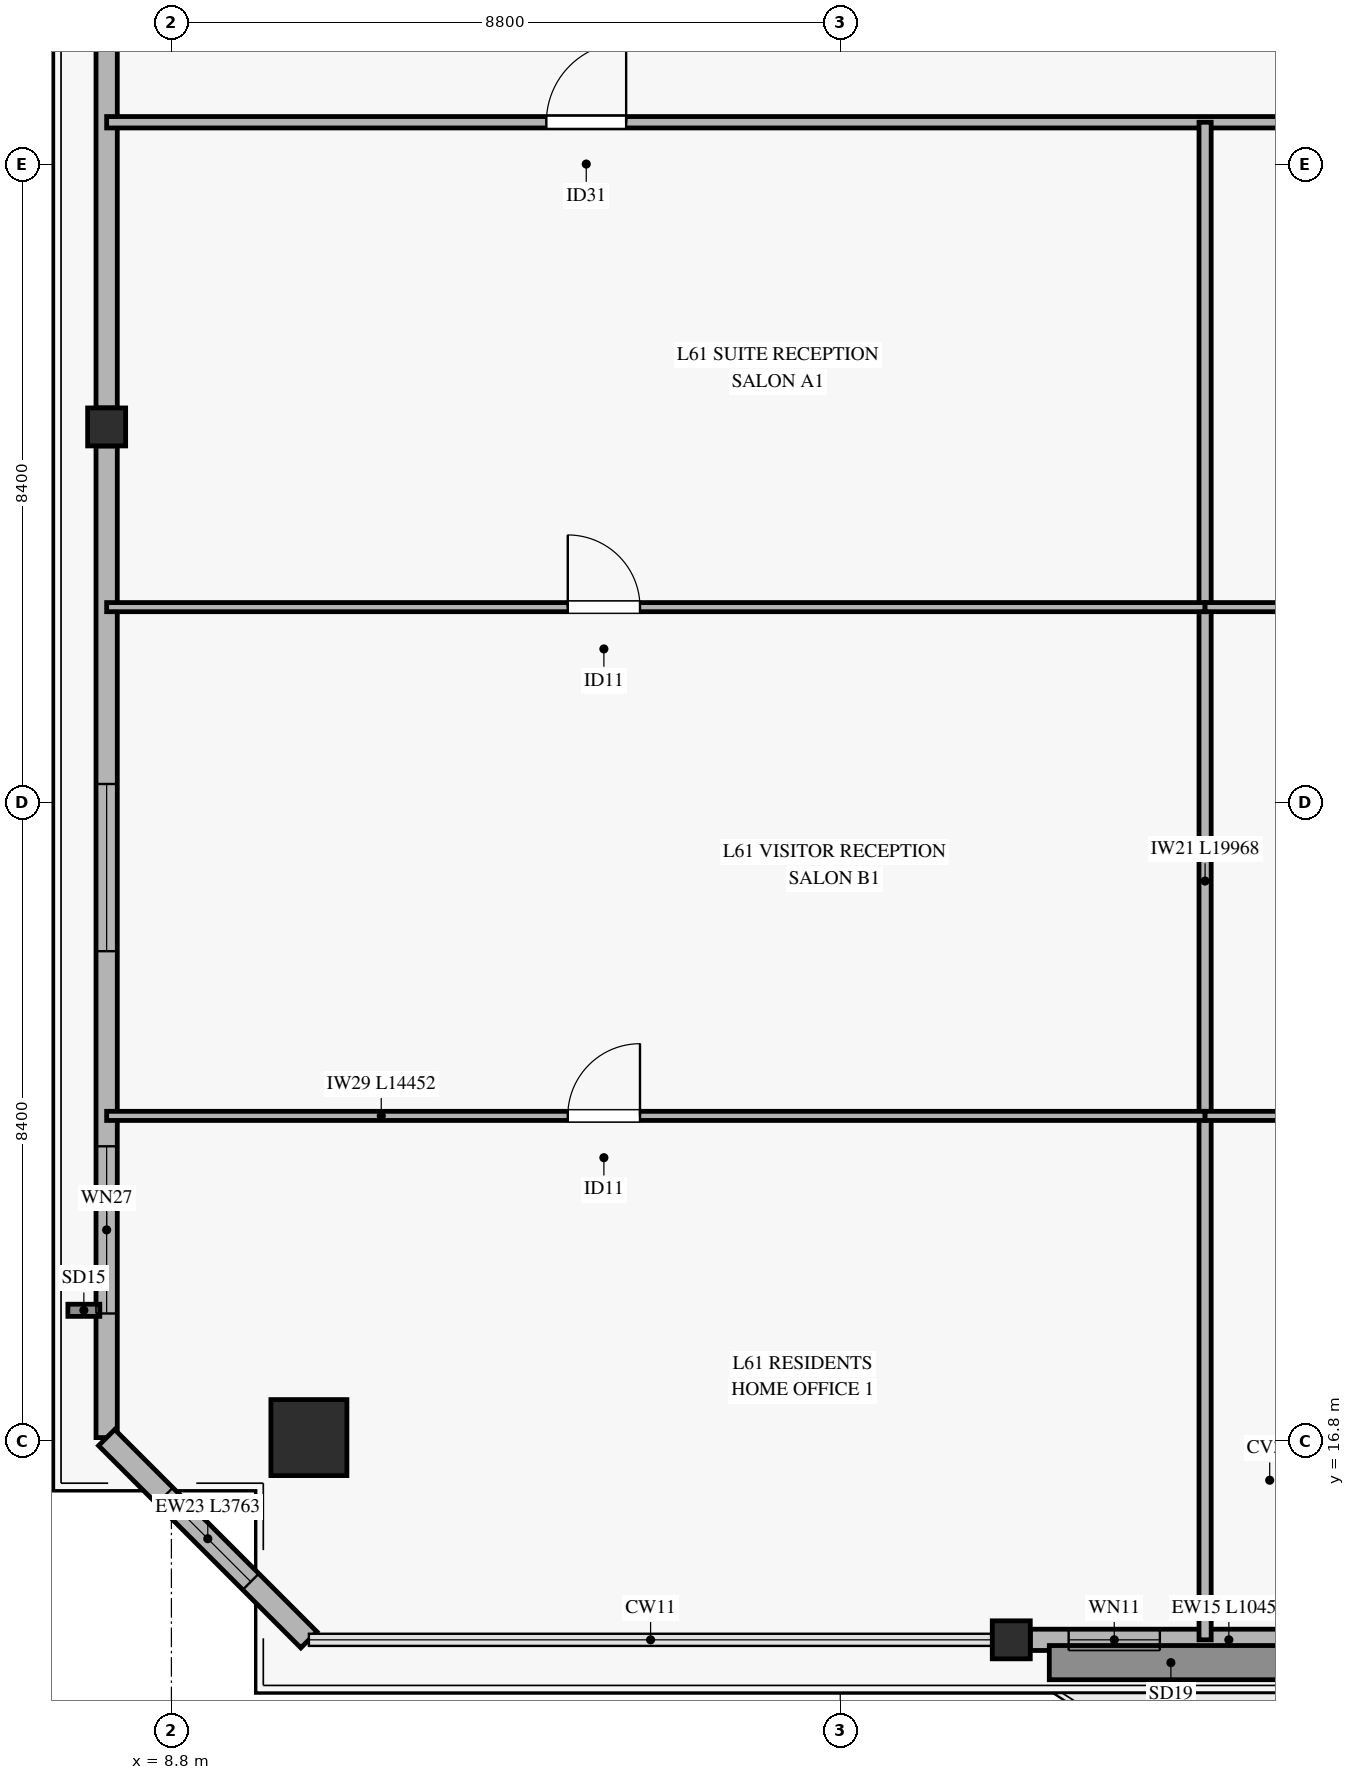
"""IFC4 building model, lengths in metres.
Left out: names, types, materials, properties, quantities, classifications, styles, units other than length and angle.
Written with IfcOpenShell. Run it as: python <this file> out.ifc"""

import sys

from ifc_helpers import new_model, si_unit, direction, frame, frame_2d, origin, origin_2d, place, context, subcontext, project, spatial, rectangle, hollow_rectangle, extrude, source, transform, mapped, element, fill, save


model = new_model("IFC4")
c1 = context("Model", 3, precision=1e-05, world=origin(), true_north=direction((0.0, 1.0)))
c2 = subcontext(c1, "Body", "Model", "MODEL_VIEW")
j1 = project(units=[si_unit("LENGTHUNIT", "METRE"), si_unit("PLANEANGLEUNIT", "RADIAN")], contexts=[c1])
p1 = place(None, origin())
s1 = spatial("IfcSite", under=j1, at=p1, CompositionType="ELEMENT")
p2 = place(p1, origin())
s2 = spatial("IfcBuilding", under=s1, at=p2, CompositionType="ELEMENT")
p3 = place(p2, frame((0.0, 0.0, 241.7)))
s3 = spatial("IfcBuildingStorey", under=s2, at=p3, CompositionType="ELEMENT", Elevation=241.7)
m1 = source(origin(), c2, "Body", "SweptSolid", [
    extrude(hollow_rectangle(XDim=1.0, YDim=1.0, WallThickness=0.045, at=origin_2d()), origin(), (0.0, 0.0, 1.0), 3.185),
])
p4 = place(p3, frame((10.609, 16.843, 0.0), z_axis=(0.0, 0.0, 1.0), x_axis=(1.0, 0.0, 0.0)))
e1 = element("IfcColumn", 1, at=p4, inside=s3, PredefinedType="COLUMN", context=c2, shape_type="MappedRepresentation", body=[
    mapped(m1, transform((0.0, 0.0, 0.0), x_axis=(1.0, 0.0, 0.0), y_axis=(0.0, 1.0, 0.0), z_axis=(0.0, 0.0, 1.0), scale=1.0)),
])
m2 = source(origin(), c2, "Body", "SweptSolid", [
    extrude(hollow_rectangle(XDim=0.5, YDim=0.5, WallThickness=0.024, at=origin_2d()), origin(), (0.0, 0.0, 1.0), 3.185),
])
for number, where, z_axis, x_axis in (
    (2, (19.85, 14.182, 0.0), (0.0, 0.0, 1.0), (1.0, 0.0, 0.0)),
    (3, (7.948, 30.141, 0.0), (0.0, 0.0, 1.0), (1.0, 0.0, 0.0)),
):
    element("IfcColumn", number, at=place(p3, frame(where, z_axis=z_axis, x_axis=x_axis)), inside=s3, PredefinedType="COLUMN", context=c2, shape_type="MappedRepresentation", body=[
        mapped(m2, transform((0.0, 0.0, 0.0), x_axis=(1.0, 0.0, 0.0), y_axis=(0.0, 1.0, 0.0), z_axis=(0.0, 0.0, 1.0), scale=1.0)),
    ])
p5 = place(p3, frame((20.1, 14.182, 0.0), z_axis=(0.0, 0.0, 1.0), x_axis=(1.0, 0.0, 0.0)))
e4 = element("IfcWall", 4, at=p5, inside=s3, PredefinedType="SOLIDWALL", context=c2, shape_type="SweptSolid", body=[
    extrude(rectangle(XDim=10.45, YDim=0.28, at=frame_2d((5.225, 0.0))), origin(), (0.0, 0.0, 1.0), 2.815),
])
p6 = place(p5, frame((4.3, 0.0, 0.0)))
e5 = element("IfcOpeningElement", 5, at=p6, cuts=e4, PredefinedType="OPENING", context=c2, shape_type="SweptSolid", body=[
    extrude(rectangle(XDim=1.8, YDim=2.25, at=frame_2d((0.9, 1.125))), frame((0.0, 0.15, 0.0), z_axis=(0.0, -1.0, 0.0), x_axis=(1.0, 0.0, 0.0)), (0.0, 0.0, 1.0), 0.3),
])
p7 = place(p5, frame((0.505, 0.0, 0.45)))
e6 = element("IfcOpeningElement", 6, at=p7, cuts=e4, PredefinedType="OPENING", context=c2, shape_type="SweptSolid", body=[
    extrude(rectangle(XDim=1.2, YDim=2.0, at=frame_2d((0.6, 1.0))), frame((0.0, 0.15, 0.0), z_axis=(0.0, -1.0, 0.0), x_axis=(1.0, 0.0, 0.0)), (0.0, 0.0, 1.0), 0.3),
])
p8 = place(p5, frame((6.48, 0.0, 0.45)))
e7 = element("IfcOpeningElement", 7, at=p8, cuts=e4, PredefinedType="OPENING", context=c2, shape_type="SweptSolid", body=[
    extrude(rectangle(XDim=1.6, YDim=2.0, at=frame_2d((0.8, 1.0))), frame((0.0, 0.15, 0.0), z_axis=(0.0, -1.0, 0.0), x_axis=(1.0, 0.0, 0.0)), (0.0, 0.0, 1.0), 0.3),
])
p9 = place(p3, frame((7.948, 16.843, 0.0), z_axis=(0.0, 0.0, 1.0), x_axis=(0.0, 1.0, 0.0)))
e8 = element("IfcWall", 8, at=p9, inside=s3, PredefinedType="SOLIDWALL", context=c2, shape_type="SweptSolid", body=[
    extrude(rectangle(XDim=13.048, YDim=0.28, at=frame_2d((6.524, 0.0))), origin(), (0.0, 0.0, 1.0), 2.815),
])
p10 = place(p9, frame((1.633, 0.0, 0.45)))
e9 = element("IfcOpeningElement", 9, at=p10, cuts=e8, PredefinedType="OPENING", context=c2, shape_type="SweptSolid", body=[
    extrude(rectangle(XDim=2.2, YDim=2.1, at=frame_2d((1.1, 1.05))), frame((0.0, 0.15, 0.0), z_axis=(0.0, -1.0, 0.0), x_axis=(1.0, 0.0, 0.0)), (0.0, 0.0, 1.0), 0.3),
])
p11 = place(p9, frame((6.4, 0.0, 0.45)))
e10 = element("IfcOpeningElement", 10, at=p11, cuts=e8, PredefinedType="OPENING", context=c2, shape_type="SweptSolid", body=[
    extrude(rectangle(XDim=2.2, YDim=2.1, at=frame_2d((1.1, 1.05))), frame((0.0, 0.15, 0.0), z_axis=(0.0, -1.0, 0.0), x_axis=(1.0, 0.0, 0.0)), (0.0, 0.0, 1.0), 0.3),
])
p12 = place(p3, frame((7.948, 30.391, 0.0), z_axis=(0.0, 0.0, 1.0), x_axis=(0.0, 1.0, 0.0)))
e11 = element("IfcWall", 11, at=p12, inside=s3, PredefinedType="SOLIDWALL", context=c2, shape_type="SweptSolid", body=[
    extrude(rectangle(XDim=13.048, YDim=0.28, at=frame_2d((6.524, 0.0))), origin(), (0.0, 0.0, 1.0), 2.815),
])
p13 = place(p12, frame((8.163, 0.0, 0.45)))
e12 = element("IfcOpeningElement", 12, at=p13, cuts=e11, PredefinedType="OPENING", context=c2, shape_type="SweptSolid", body=[
    extrude(rectangle(XDim=2.2, YDim=2.1, at=frame_2d((1.1, 1.05))), frame((0.0, 0.15, 0.0), z_axis=(0.0, -1.0, 0.0), x_axis=(1.0, 0.0, 0.0)), (0.0, 0.0, 1.0), 0.3),
])
p14 = place(p3, frame((7.948, 16.843, 0.0), z_axis=(0.0, 0.0, 1.0), x_axis=(0.707074342864, -0.707139218021, 0.0)))
e13 = element("IfcWall", 13, at=p14, inside=s3, PredefinedType="SOLIDWALL", context=c2, shape_type="SweptSolid", body=[
    extrude(rectangle(XDim=3.763, YDim=0.3, at=frame_2d((1.882, 0.0))), origin(), (0.0, 0.0, 1.0), 2.815),
])
p15 = place(p14, frame((1.082, 0.0, 0.45)))
e14 = element("IfcOpeningElement", 14, at=p15, cuts=e13, PredefinedType="OPENING", context=c2, shape_type="SweptSolid", body=[
    extrude(rectangle(XDim=1.6, YDim=2.0, at=frame_2d((0.8, 1.0))), frame((0.0, 0.16, 0.0), z_axis=(0.0, -1.0, 0.0), x_axis=(1.0, 0.0, 0.0)), (0.0, 0.0, 1.0), 0.32),
])
p16 = place(p3, frame((7.948, 34.15, 0.0), z_axis=(0.0, 0.0, 1.0), x_axis=(1.0, 0.0, 0.0)))
e15 = element("IfcWall", 15, at=p16, inside=s3, PredefinedType="PARTITIONING", context=c2, shape_type="SweptSolid", body=[
    extrude(rectangle(XDim=54.504, YDim=0.15, at=frame_2d((27.252, 0.0))), origin(), (0.0, 0.0, 1.0), 2.47),
])
p17 = place(p16, frame((5.785, 0.0, 0.0)))
e16 = element("IfcOpeningElement", 16, at=p17, cuts=e15, PredefinedType="OPENING", context=c2, shape_type="SweptSolid", body=[
    extrude(rectangle(XDim=1.05, YDim=2.15, at=frame_2d((0.525, 1.075))), frame((0.0, 0.085, 0.0), z_axis=(0.0, -1.0, 0.0), x_axis=(1.0, 0.0, 0.0)), (0.0, 0.0, 1.0), 0.17),
])
p18 = place(p16, frame((16.977, 0.0, 0.0)))
e17 = element("IfcOpeningElement", 17, at=p18, cuts=e15, PredefinedType="OPENING", context=c2, shape_type="SweptSolid", body=[
    extrude(rectangle(XDim=1.05, YDim=2.15, at=frame_2d((0.525, 1.075))), frame((0.0, 0.085, 0.0), z_axis=(0.0, -1.0, 0.0), x_axis=(1.0, 0.0, 0.0)), (0.0, 0.0, 1.0), 0.17),
])
p19 = place(p16, frame((23.427, 0.0, 0.0)))
e18 = element("IfcOpeningElement", 18, at=p19, cuts=e15, PredefinedType="OPENING", context=c2, shape_type="SweptSolid", body=[
    extrude(rectangle(XDim=1.05, YDim=2.15, at=frame_2d((0.525, 1.075))), frame((0.0, 0.085, 0.0), z_axis=(0.0, -1.0, 0.0), x_axis=(1.0, 0.0, 0.0)), (0.0, 0.0, 1.0), 0.17),
])
p20 = place(p16, frame((29.827, 0.0, 0.0)))
e19 = element("IfcOpeningElement", 19, at=p20, cuts=e15, PredefinedType="OPENING", context=c2, shape_type="SweptSolid", body=[
    extrude(rectangle(XDim=1.05, YDim=2.15, at=frame_2d((0.525, 1.075))), frame((0.0, 0.085, 0.0), z_axis=(0.0, -1.0, 0.0), x_axis=(1.0, 0.0, 0.0)), (0.0, 0.0, 1.0), 0.17),
])
p21 = place(p16, frame((36.927, 0.0, 0.0)))
e20 = element("IfcOpeningElement", 20, at=p21, cuts=e15, PredefinedType="OPENING", context=c2, shape_type="SweptSolid", body=[
    extrude(rectangle(XDim=1.05, YDim=2.15, at=frame_2d((0.525, 1.075))), frame((0.0, 0.085, 0.0), z_axis=(0.0, -1.0, 0.0), x_axis=(1.0, 0.0, 0.0)), (0.0, 0.0, 1.0), 0.17),
])
p22 = place(p16, frame((46.381, 0.0, 0.0)))
e21 = element("IfcOpeningElement", 21, at=p22, cuts=e15, PredefinedType="OPENING", context=c2, shape_type="SweptSolid", body=[
    extrude(rectangle(XDim=1.05, YDim=2.15, at=frame_2d((0.525, 1.075))), frame((0.0, 0.085, 0.0), z_axis=(0.0, -1.0, 0.0), x_axis=(1.0, 0.0, 0.0)), (0.0, 0.0, 1.0), 0.17),
])
p23 = place(p3, frame((22.4, 14.182, 0.0), z_axis=(0.0, 0.0, 1.0), x_axis=(0.0, 1.0, 0.0)))
e22 = element("IfcWall", 22, at=p23, inside=s3, PredefinedType="PARTITIONING", context=c2, shape_type="SweptSolid", body=[
    extrude(rectangle(XDim=19.968, YDim=0.16, at=frame_2d((9.984, 0.0))), origin(), (0.0, 0.0, 1.0), 2.77),
])
p24 = place(p3, frame((7.948, 21.076, 0.0), z_axis=(0.0, 0.0, 1.0), x_axis=(1.0, 0.0, 0.0)))
e23 = element("IfcWall", 23, at=p24, inside=s3, PredefinedType="PARTITIONING", context=c2, shape_type="SweptSolid", body=[
    extrude(rectangle(XDim=14.452, YDim=0.12, at=frame_2d((7.226, 0.0))), origin(), (0.0, 0.0, 1.0), 2.47),
])
p25 = place(p24, frame((6.067, 0.0, 0.0)))
e24 = element("IfcOpeningElement", 24, at=p25, cuts=e23, PredefinedType="OPENING", context=c2, shape_type="SweptSolid", body=[
    extrude(rectangle(XDim=0.95, YDim=2.1, at=frame_2d((0.475, 1.05))), frame((0.0, 0.07, 0.0), z_axis=(0.0, -1.0, 0.0), x_axis=(1.0, 0.0, 0.0)), (0.0, 0.0, 1.0), 0.14),
])
p26 = place(p3, frame((7.948, 27.77, 0.0), z_axis=(0.0, 0.0, 1.0), x_axis=(1.0, 0.0, 0.0)))
e25 = element("IfcWall", 25, at=p26, inside=s3, PredefinedType="PARTITIONING", context=c2, shape_type="SweptSolid", body=[
    extrude(rectangle(XDim=14.452, YDim=0.12, at=frame_2d((7.226, 0.0))), origin(), (0.0, 0.0, 1.0), 2.47),
])
p27 = place(p26, frame((6.067, 0.0, 0.0)))
e26 = element("IfcOpeningElement", 26, at=p27, cuts=e25, PredefinedType="OPENING", context=c2, shape_type="SweptSolid", body=[
    extrude(rectangle(XDim=0.95, YDim=2.1, at=frame_2d((0.475, 1.05))), frame((0.0, 0.07, 0.0), z_axis=(0.0, -1.0, 0.0), x_axis=(1.0, 0.0, 0.0)), (0.0, 0.0, 1.0), 0.14),
])
p28 = place(p3, frame((22.4, 21.076, 0.0), z_axis=(0.0, 0.0, 1.0), x_axis=(1.0, 0.0, 0.0)))
e27 = element("IfcWall", 27, at=p28, inside=s3, PredefinedType="PARTITIONING", context=c2, shape_type="SweptSolid", body=[
    extrude(rectangle(XDim=6.2, YDim=0.12, at=frame_2d((3.1, 0.0))), origin(), (0.0, 0.0, 1.0), 3.185),
])
p29 = place(p28, frame((2.646, 0.0, 0.0)))
e28 = element("IfcOpeningElement", 28, at=p29, cuts=e27, PredefinedType="OPENING", context=c2, shape_type="SweptSolid", body=[
    extrude(rectangle(XDim=0.95, YDim=2.1, at=frame_2d((0.475, 1.05))), frame((0.0, 0.07, 0.0), z_axis=(0.0, -1.0, 0.0), x_axis=(1.0, 0.0, 0.0)), (0.0, 0.0, 1.0), 0.14),
])
p30 = place(p3, frame((22.4, 27.77, 0.0), z_axis=(0.0, 0.0, 1.0), x_axis=(1.0, 0.0, 0.0)))
e29 = element("IfcWall", 29, at=p30, inside=s3, PredefinedType="PARTITIONING", context=c2, shape_type="SweptSolid", body=[
    extrude(rectangle(XDim=6.2, YDim=0.12, at=frame_2d((3.1, 0.0))), origin(), (0.0, 0.0, 1.0), 3.185),
])
p31 = place(p30, frame((2.646, 0.0, 0.0)))
e30 = element("IfcOpeningElement", 30, at=p31, cuts=e29, PredefinedType="OPENING", context=c2, shape_type="SweptSolid", body=[
    extrude(rectangle(XDim=0.95, YDim=2.1, at=frame_2d((0.475, 1.05))), frame((0.0, 0.07, 0.0), z_axis=(0.0, -1.0, 0.0), x_axis=(1.0, 0.0, 0.0)), (0.0, 0.0, 1.0), 0.14),
])
m3 = source(origin(), c2, "Body", "SweptSolid", [
    extrude(rectangle(XDim=1.2, YDim=2.0, at=frame_2d((0.6, 1.0))), frame((0.0, 0.03, 0.0), z_axis=(0.0, -1.0, 0.0), x_axis=(1.0, 0.0, 0.0)), (0.0, 0.0, 1.0), 0.06),
])
p32 = place(p7, origin())
e31 = element("IfcWindow", 31, at=p32, inside=s3, PartitioningType="SINGLE_PANEL", PredefinedType="WINDOW", context=c2, shape_type="MappedRepresentation", body=[
    mapped(m3, transform((0.0, 0.0, 0.0), x_axis=(1.0, 0.0, 0.0), y_axis=(0.0, 1.0, 0.0), z_axis=(0.0, 0.0, 1.0), scale=1.0)),
])
fill(e6, e31)
m4 = source(origin(), c2, "Body", "SweptSolid", [
    extrude(rectangle(XDim=2.2, YDim=2.1, at=frame_2d((1.1, 1.05))), frame((0.0, 0.03, 0.0), z_axis=(0.0, -1.0, 0.0), x_axis=(1.0, 0.0, 0.0)), (0.0, 0.0, 1.0), 0.06),
])
p33 = place(p10, origin())
e32 = element("IfcWindow", 32, at=p33, inside=s3, PartitioningType="SINGLE_PANEL", PredefinedType="WINDOW", context=c2, shape_type="MappedRepresentation", body=[
    mapped(m4, transform((0.0, 0.0, 0.0), x_axis=(1.0, 0.0, 0.0), y_axis=(0.0, 1.0, 0.0), z_axis=(0.0, 0.0, 1.0), scale=1.0)),
])
fill(e9, e32)
p34 = place(p11, origin())
e33 = element("IfcWindow", 33, at=p34, inside=s3, PartitioningType="SINGLE_PANEL", PredefinedType="WINDOW", context=c2, shape_type="MappedRepresentation", body=[
    mapped(m4, transform((0.0, 0.0, 0.0), x_axis=(1.0, 0.0, 0.0), y_axis=(0.0, 1.0, 0.0), z_axis=(0.0, 0.0, 1.0), scale=1.0)),
])
fill(e10, e33)
m5 = source(origin(), c2, "Body", "SweptSolid", [
    extrude(rectangle(XDim=1.6, YDim=2.0, at=frame_2d((0.8, 1.0))), frame((0.0, 0.03, 0.0), z_axis=(0.0, -1.0, 0.0), x_axis=(1.0, 0.0, 0.0)), (0.0, 0.0, 1.0), 0.06),
])
p35 = place(p15, origin())
e34 = element("IfcWindow", 34, at=p35, inside=s3, PartitioningType="SINGLE_PANEL", PredefinedType="WINDOW", context=c2, shape_type="MappedRepresentation", body=[
    mapped(m5, transform((0.0, 0.0, 0.0), x_axis=(1.0, 0.0, 0.0), y_axis=(0.0, 1.0, 0.0), z_axis=(0.0, 0.0, 1.0), scale=1.0)),
])
fill(e14, e34)
m6 = source(origin(), c2, "Body", "SweptSolid", [
    extrude(rectangle(XDim=1.05, YDim=2.15, at=frame_2d((0.525, 1.075))), frame((0.0, 0.025, 0.0), z_axis=(0.0, -1.0, 0.0), x_axis=(1.0, 0.0, 0.0)), (0.0, 0.0, 1.0), 0.05),
])
p36 = place(p17, origin())
e35 = element("IfcDoor", 35, at=p36, inside=s3, OperationType="SINGLE_SWING_RIGHT", PredefinedType="DOOR", context=c2, shape_type="MappedRepresentation", body=[
    mapped(m6, transform((0.0, 0.0, 0.0), x_axis=(1.0, 0.0, 0.0), y_axis=(0.0, 1.0, 0.0), z_axis=(0.0, 0.0, 1.0), scale=1.0)),
])
fill(e16, e35)
m7 = source(origin(), c2, "Body", "SweptSolid", [
    extrude(rectangle(XDim=0.95, YDim=2.1, at=frame_2d((0.475, 1.05))), frame((0.0, 0.025, 0.0), z_axis=(0.0, -1.0, 0.0), x_axis=(1.0, 0.0, 0.0)), (0.0, 0.0, 1.0), 0.05),
])
p37 = place(p27, origin())
e36 = element("IfcDoor", 36, at=p37, inside=s3, OperationType="SINGLE_SWING_LEFT", PredefinedType="DOOR", context=c2, shape_type="MappedRepresentation", body=[
    mapped(m7, transform((0.0, 0.0, 0.0), x_axis=(1.0, 0.0, 0.0), y_axis=(0.0, 1.0, 0.0), z_axis=(0.0, 0.0, 1.0), scale=1.0)),
])
fill(e26, e36)
p38 = place(p25, origin())
e37 = element("IfcDoor", 37, at=p38, inside=s3, OperationType="SINGLE_SWING_RIGHT", PredefinedType="DOOR", context=c2, shape_type="MappedRepresentation", body=[
    mapped(m7, transform((0.0, 0.0, 0.0), x_axis=(1.0, 0.0, 0.0), y_axis=(0.0, 1.0, 0.0), z_axis=(0.0, 0.0, 1.0), scale=1.0)),
])
fill(e24, e37)
save(model, sys.argv[1])
